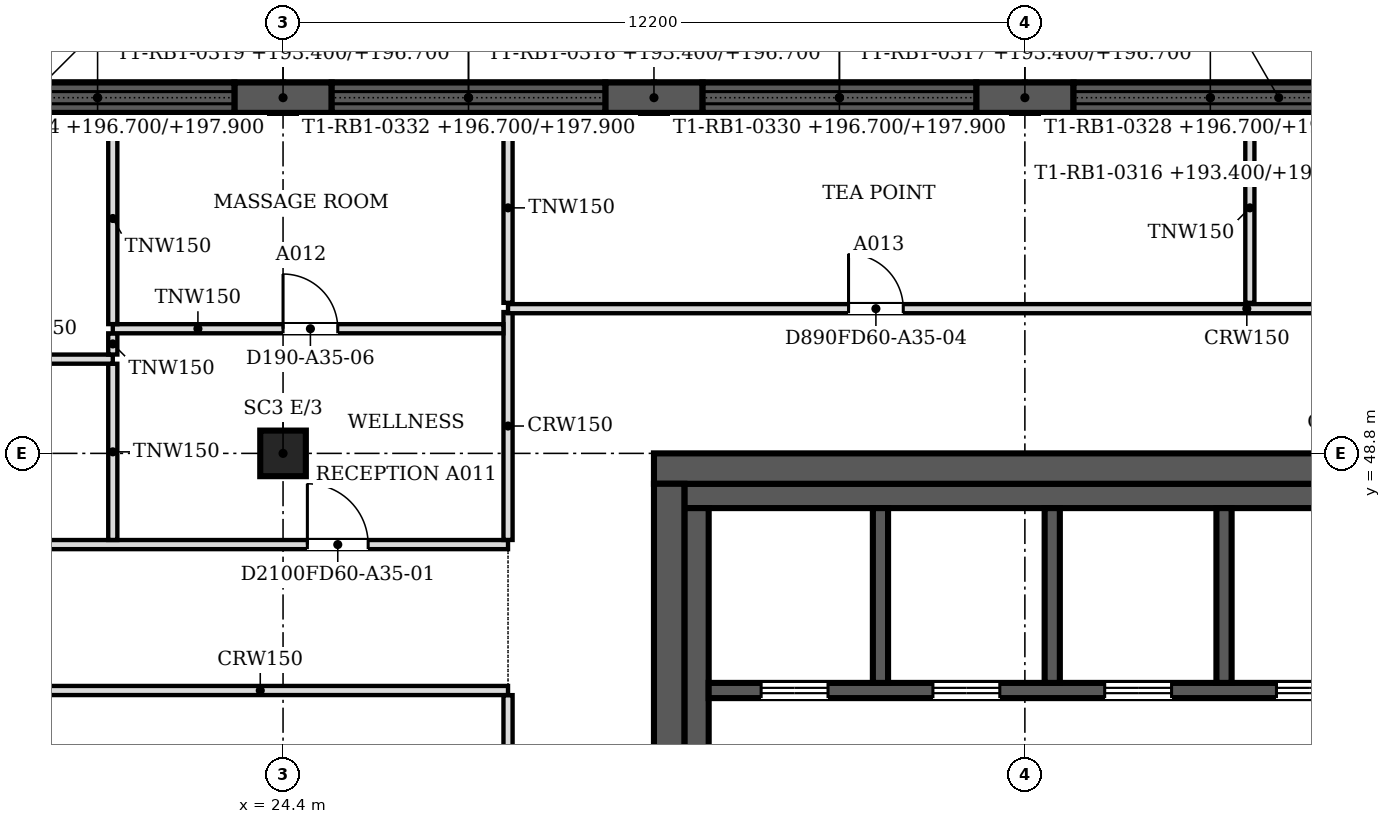
"""IFC4 building model, lengths in metres.
Left out: names, types, materials, properties, quantities, classifications, styles, units other than length and angle.
Written with IfcOpenShell. Run it as: python <this file> out.ifc"""

import sys

from ifc_helpers import new_model, si_unit, direction, frame, frame_2d, origin, origin_2d, place, context, subcontext, project, spatial, polyline, rectangle, outline, extrude, faceted_brep, source, transform, mapped, element, fill, save


model = new_model("IFC4")
c1 = context("Model", 3, precision=1e-05, world=origin(), true_north=direction((0.0, 1.0)))
c2 = subcontext(c1, "Body", "Model", "MODEL_VIEW")
j1 = project(units=[si_unit("LENGTHUNIT", "METRE"), si_unit("PLANEANGLEUNIT", "RADIAN")], contexts=[c1])
p1 = place(None, origin())
s1 = spatial("IfcSite", under=j1, at=p1, CompositionType="ELEMENT")
p2 = place(p1, origin())
s2 = spatial("IfcBuilding", under=s1, at=p2, CompositionType="ELEMENT")
p3 = place(p2, frame((0.0, 0.0, 193.4)))
s3 = spatial("IfcBuildingStorey", under=s2, at=p3, CompositionType="ELEMENT", Elevation=193.4)
p4 = place(p3, frame((24.4, 48.8, 0.0), z_axis=(0.0, 0.0, 1.0), x_axis=(1.0, 0.0, 0.0)))
e1 = element("IfcColumn", 1, at=p4, inside=s3, PredefinedType="COLUMN", context=c2, shape_type="SweptSolid", body=[
    extrude(rectangle(XDim=0.75, YDim=0.75, at=origin_2d()), origin(), (0.0, 0.0, 1.0), 4.3),
])
m1 = source(origin(), c2, "Body", "Brep", [
    faceted_brep([(0.0, -0.25, 0.0), (1.6, -0.25, 0.0), (1.6, -0.25, 3.3), (0.0, -0.25, 3.3), (0.0, 0.25, 3.3), (1.6, 0.25, 3.3), (1.6, 0.25, 0.0), (0.0, 0.25, 0.0)], [[[0, 1, 2, 3]], [[4, 5, 6, 7]], [[7, 6, 1, 0]], [[5, 4, 3, 2]], [[4, 7, 0, 3]], [[1, 6, 5, 2]]]),
])
p5 = place(p3, frame((37.4, 54.65, 0.0), z_axis=(0.0, 0.0, 1.0), x_axis=(-1.0, 0.0, 0.0)))
e2 = element("IfcWall", 2, at=p5, inside=s3, PredefinedType="SOLIDWALL", context=c2, shape_type="MappedRepresentation", body=[
    mapped(m1, transform((0.0, 0.0, 0.0), scale=1.0)),
])
m2 = source(origin(), c2, "Body", "SweptSolid", [
    extrude(outline(polyline([(0.0, 0.0), (1.6, 0.0), (1.6, 3.3), (0.0, 3.3), (0.0, 0.0)])), frame((0.0, 0.25, 0.0), z_axis=(0.0, -1.0, 0.0), x_axis=(1.0, 0.0, 0.0)), (0.0, 0.0, 1.0), 0.5),
])
p6 = place(p3, frame((31.3, 54.65, 0.0), z_axis=(0.0, 0.0, 1.0), x_axis=(-1.0, 0.0, 0.0)))
e3 = element("IfcWall", 3, at=p6, inside=s3, PredefinedType="SOLIDWALL", context=c2, shape_type="MappedRepresentation", body=[
    mapped(m2, transform((0.0, 0.0, 0.0), scale=1.0)),
])
p7 = place(p3, frame((25.2, 54.65, 0.0), z_axis=(0.0, 0.0, 1.0), x_axis=(-1.0, 0.0, 0.0)))
e4 = element("IfcWall", 4, at=p7, inside=s3, PredefinedType="SOLIDWALL", context=c2, shape_type="MappedRepresentation", body=[
    mapped(m1, transform((0.0, 0.0, 0.0), scale=1.0)),
])
m3 = source(origin(), c2, "Body", "SweptSolid", [
    extrude(outline(polyline([(0.0, 0.0), (4.5, 0.0), (4.5, 0.9), (0.0, 0.9), (0.0, 0.0)])), frame((0.0, 0.25, 0.0), z_axis=(0.0, -1.0, 0.0), x_axis=(1.0, 0.0, 0.0)), (0.0, 0.0, 1.0), 0.5),
])
p8 = place(p3, frame((41.9, 54.65, 0.0), z_axis=(0.0, 0.0, 1.0), x_axis=(-1.0, 0.0, 0.0)))
e5 = element("IfcWall", 5, at=p8, inside=s3, PredefinedType="SOLIDWALL", context=c2, shape_type="MappedRepresentation", body=[
    mapped(m3, transform((0.0, 0.0, 0.0), scale=1.0)),
])
m4 = source(origin(), c2, "Body", "Brep", [
    faceted_brep([(0.0, -0.25, 0.0), (6.1, -0.25, 0.0), (6.1, -0.25, 1.2), (0.0, -0.25, 1.2), (0.0, 0.25, 1.2), (6.1, 0.25, 1.2), (6.1, 0.25, 0.0), (0.0, 0.25, 0.0)], [[[0, 1, 2, 3]], [[4, 5, 6, 7]], [[7, 6, 1, 0]], [[5, 4, 3, 2]], [[4, 7, 0, 3]], [[1, 6, 5, 2]]]),
])
p9 = place(p3, frame((42.7, 54.65, 3.3), z_axis=(0.0, 0.0, 1.0), x_axis=(-1.0, 0.0, 0.0)))
e6 = element("IfcWall", 6, at=p9, inside=s3, PredefinedType="SOLIDWALL", context=c2, shape_type="MappedRepresentation", body=[
    mapped(m4, transform((0.0, 0.0, 0.0), scale=1.0)),
])
p10 = place(p3, frame((35.8, 54.65, 0.0), z_axis=(0.0, 0.0, 1.0), x_axis=(-1.0, 0.0, 0.0)))
e7 = element("IfcWall", 7, at=p10, inside=s3, PredefinedType="SOLIDWALL", context=c2, shape_type="MappedRepresentation", body=[
    mapped(m3, transform((0.0, 0.0, 0.0), scale=1.0)),
])
m5 = source(origin(), c2, "Body", "SweptSolid", [
    extrude(outline(polyline([(0.0, 0.0), (6.1, 0.0), (6.1, 1.2), (0.0, 1.2), (0.0, 0.0)])), frame((0.0, 0.25, 0.0), z_axis=(0.0, -1.0, 0.0), x_axis=(1.0, 0.0, 0.0)), (0.0, 0.0, 1.0), 0.5),
])
p11 = place(p3, frame((36.6, 54.65, 3.3), z_axis=(0.0, 0.0, 1.0), x_axis=(-1.0, 0.0, 0.0)))
e8 = element("IfcWall", 8, at=p11, inside=s3, PredefinedType="SOLIDWALL", context=c2, shape_type="MappedRepresentation", body=[
    mapped(m5, transform((0.0, 0.0, 0.0), scale=1.0)),
])
p12 = place(p3, frame((29.7, 54.65, 0.0), z_axis=(0.0, 0.0, 1.0), x_axis=(-1.0, 0.0, 0.0)))
e9 = element("IfcWall", 9, at=p12, inside=s3, PredefinedType="SOLIDWALL", context=c2, shape_type="MappedRepresentation", body=[
    mapped(m3, transform((0.0, 0.0, 0.0), scale=1.0)),
])
p13 = place(p3, frame((30.5, 54.65, 3.3), z_axis=(0.0, 0.0, 1.0), x_axis=(-1.0, 0.0, 0.0)))
e10 = element("IfcWall", 10, at=p13, inside=s3, PredefinedType="SOLIDWALL", context=c2, shape_type="MappedRepresentation", body=[
    mapped(m5, transform((0.0, 0.0, 0.0), scale=1.0)),
])
p14 = place(p3, frame((23.6, 54.65, 0.0), z_axis=(0.0, 0.0, 1.0), x_axis=(-1.0, 0.0, 0.0)))
e11 = element("IfcWall", 11, at=p14, inside=s3, PredefinedType="SOLIDWALL", context=c2, shape_type="MappedRepresentation", body=[
    mapped(m3, transform((0.0, 0.0, 0.0), scale=1.0)),
])
p15 = place(p3, frame((24.4, 54.65, 3.3), z_axis=(0.0, 0.0, 1.0), x_axis=(-1.0, 0.0, 0.0)))
e12 = element("IfcWall", 12, at=p15, inside=s3, PredefinedType="SOLIDWALL", context=c2, shape_type="MappedRepresentation", body=[
    mapped(m4, transform((0.0, 0.0, 0.0), scale=1.0)),
])
p16 = place(p3, frame((30.75, 24.9, 0.0), z_axis=(0.0, 0.0, 1.0), x_axis=(0.0, 1.0, 0.0)))
e13 = element("IfcWall", 13, at=p16, inside=s3, PredefinedType="SHEAR", context=c2, shape_type="SweptSolid", body=[
    extrude(rectangle(XDim=23.4, YDim=0.5, at=frame_2d((11.7, 0.0))), origin(), (0.0, 0.0, 1.0), 4.5),
])
m6 = source(origin(), c2, "Body", "SweptSolid", [
    extrude(rectangle(XDim=2.1, YDim=2.4, at=frame_2d((1.05, 1.2))), frame((0.0, 0.26, 0.0), z_axis=(0.0, -1.0, 0.0), x_axis=(1.0, 0.0, 0.0)), (0.0, 0.0, 1.0), 0.52),
])
p17 = place(p16, frame((4.9, 0.0, 0.0)))
e14 = element("IfcOpeningElement", 14, at=p17, cuts=e13, PredefinedType="OPENING", context=c2, shape_type="MappedRepresentation", body=[
    mapped(m6, transform((0.0, 0.0, 0.0), scale=1.0)),
])
p18 = place(p16, frame((16.4, 0.0, 0.0)))
e15 = element("IfcOpeningElement", 15, at=p18, cuts=e13, PredefinedType="OPENING", context=c2, shape_type="MappedRepresentation", body=[
    mapped(m6, transform((0.0, 0.0, 0.0), scale=1.0)),
])
p19 = place(p3, frame((30.5, 48.55, 0.0), z_axis=(0.0, 0.0, 1.0), x_axis=(1.0, 0.0, 0.0)))
e16 = element("IfcWall", 16, at=p19, inside=s3, PredefinedType="SHEAR", context=c2, shape_type="SweptSolid", body=[
    extrude(rectangle(XDim=24.4, YDim=0.5, at=frame_2d((12.2, 0.0))), origin(), (0.0, 0.0, 1.0), 4.5),
])
p20 = place(p3, frame((31.0, 48.1, 0.0), z_axis=(0.0, 0.0, 1.0), x_axis=(1.0, 0.0, 0.0)))
e17 = element("IfcWall", 17, at=p20, inside=s3, PredefinedType="SOLIDWALL", context=c2, shape_type="SweptSolid", body=[
    extrude(rectangle(XDim=23.4, YDim=0.4, at=frame_2d((11.7, 0.0))), origin(), (0.0, 0.0, 1.0), 4.5),
])
p21 = place(p3, frame((31.2, 43.4, 0.0), z_axis=(0.0, 0.0, 1.0), x_axis=(0.0, 1.0, 0.0)))
e18 = element("IfcWall", 18, at=p21, inside=s3, PredefinedType="SOLIDWALL", context=c2, shape_type="SweptSolid", body=[
    extrude(rectangle(XDim=4.5, YDim=0.4, at=frame_2d((2.25, 0.0))), origin(), (0.0, 0.0, 1.0), 4.5),
])
p22 = place(p3, frame((42.45, 44.9, 0.0), z_axis=(0.0, 0.0, 1.0), x_axis=(-1.0, 0.0, 0.0)))
e19 = element("IfcWall", 19, at=p22, inside=s3, PredefinedType="SOLIDWALL", context=c2, shape_type="SweptSolid", body=[
    extrude(rectangle(XDim=11.05, YDim=0.25, at=frame_2d((5.525, 0.0))), origin(), (0.0, 0.0, 1.0), 4.5),
])
m7 = source(origin(), c2, "Body", "SweptSolid", [
    extrude(rectangle(XDim=1.1, YDim=2.1, at=frame_2d((0.55, 1.05))), frame((0.0, 0.135, 0.0), z_axis=(0.0, -1.0, 0.0), x_axis=(1.0, 0.0, 0.0)), (0.0, 0.0, 1.0), 0.27),
])
p23 = place(p22, frame((9.087, 0.0, 0.0)))
e20 = element("IfcOpeningElement", 20, at=p23, cuts=e19, PredefinedType="OPENING", context=c2, shape_type="MappedRepresentation", body=[
    mapped(m7, transform((0.0, 0.0, 0.0), scale=1.0)),
])
p24 = place(p22, frame((6.262, 0.0, 0.0)))
e21 = element("IfcOpeningElement", 21, at=p24, cuts=e19, PredefinedType="OPENING", context=c2, shape_type="MappedRepresentation", body=[
    mapped(m7, transform((0.0, 0.0, 0.0), scale=1.0)),
])
p25 = place(p22, frame((3.438, 0.0, 0.0)))
e22 = element("IfcOpeningElement", 22, at=p25, cuts=e19, PredefinedType="OPENING", context=c2, shape_type="MappedRepresentation", body=[
    mapped(m7, transform((0.0, 0.0, 0.0), scale=1.0)),
])
p26 = place(p22, frame((0.613, 0.0, 0.0)))
e23 = element("IfcOpeningElement", 23, at=p26, cuts=e19, PredefinedType="OPENING", context=c2, shape_type="MappedRepresentation", body=[
    mapped(m7, transform((0.0, 0.0, 0.0), scale=1.0)),
])
for number, where, z_axis, x_axis in (
    (24, (34.225, 45.025, 0.0), (0.0, 0.0, 1.0), (0.0, 1.0, 0.0)),
    (25, (37.05, 45.025, 0.0), (0.0, 0.0, 1.0), (0.0, 1.0, 0.0)),
    (26, (39.875, 45.025, 0.0), (0.0, 0.0, 1.0), (0.0, 1.0, 0.0)),
):
    element("IfcWall", number, at=place(p3, frame(where, z_axis=z_axis, x_axis=x_axis)), inside=s3, PredefinedType="SOLIDWALL", context=c2, shape_type="SweptSolid", body=[
        extrude(rectangle(XDim=2.875, YDim=0.25, at=frame_2d((1.438, 0.0))), origin(), (0.0, 0.0, 1.0), 4.5),
    ])
p27 = place(p3, frame((28.1, 18.8, 0.0), z_axis=(0.0, 0.0, 1.0), x_axis=(0.0, 1.0, 0.0)))
e27 = element("IfcWall", 27, at=p27, inside=s3, PredefinedType="PARTITIONING", context=c2, shape_type="SweptSolid", body=[
    extrude(rectangle(XDim=26.024, YDim=0.15, at=frame_2d((13.012, 0.0))), origin(), (0.0, 0.0, 1.0), 3.767),
])
m8 = source(origin(), c2, "Body", "SweptSolid", [
    extrude(rectangle(XDim=1.8, YDim=2.1, at=frame_2d((0.9, 1.05))), frame((0.0, 0.085, 0.0), z_axis=(0.0, -1.0, 0.0), x_axis=(1.0, 0.0, 0.0)), (0.0, 0.0, 1.0), 0.17),
])
p28 = place(p27, frame((0.7, 0.0, 0.0)))
e28 = element("IfcOpeningElement", 28, at=p28, cuts=e27, PredefinedType="OPENING", context=c2, shape_type="MappedRepresentation", body=[
    mapped(m8, transform((0.0, 0.0, 0.0), scale=1.0)),
])
p29 = place(p27, frame((22.551, 0.0, 0.0)))
e29 = element("IfcOpeningElement", 29, at=p29, cuts=e27, PredefinedType="OPENING", context=c2, shape_type="MappedRepresentation", body=[
    mapped(m8, transform((0.0, 0.0, 0.0), scale=1.0)),
])
p30 = place(p27, frame((16.851, 0.0, 0.0)))
e30 = element("IfcOpeningElement", 30, at=p30, cuts=e27, PredefinedType="OPENING", context=c2, shape_type="MappedRepresentation", body=[
    mapped(m8, transform((0.0, 0.0, 0.0), scale=1.0)),
])
p31 = place(p27, frame((9.3, 0.0, 0.0)))
e31 = element("IfcOpeningElement", 31, at=p31, cuts=e27, PredefinedType="OPENING", context=c2, shape_type="MappedRepresentation", body=[
    mapped(m8, transform((0.0, 0.0, 0.0), scale=1.0)),
])
p32 = place(p3, frame((28.1, 44.9, 0.0), z_axis=(0.0, 0.0, 1.0), x_axis=(-1.0, 0.0, 0.0)))
e32 = element("IfcWall", 32, at=p32, inside=s3, PredefinedType="PARTITIONING", context=c2, shape_type="SweptSolid", body=[
    extrude(rectangle(XDim=20.6, YDim=0.15, at=frame_2d((10.3, 0.0))), origin(), (0.0, 0.0, 1.0), 3.767),
])
m9 = source(origin(), c2, "Body", "SweptSolid", [
    extrude(rectangle(XDim=0.9, YDim=2.1, at=frame_2d((0.45, 1.05))), frame((0.0, 0.085, 0.0), z_axis=(0.0, -1.0, 0.0), x_axis=(1.0, 0.0, 0.0)), (0.0, 0.0, 1.0), 0.17),
])
p33 = place(p32, frame((16.299, 0.0, 0.0)))
e33 = element("IfcOpeningElement", 33, at=p33, cuts=e32, PredefinedType="OPENING", context=c2, shape_type="MappedRepresentation", body=[
    mapped(m9, transform((0.0, 0.0, 0.0), scale=1.0)),
])
p34 = place(p3, frame((7.5, 47.3, 0.0), z_axis=(0.0, 0.0, 1.0), x_axis=(1.0, 0.0, 0.0)))
e34 = element("IfcWall", 34, at=p34, inside=s3, PredefinedType="PARTITIONING", context=c2, shape_type="SweptSolid", body=[
    extrude(rectangle(XDim=20.6, YDim=0.15, at=frame_2d((10.3, 0.0))), origin(), (0.0, 0.0, 1.0), 3.767),
])
m10 = source(origin(), c2, "Body", "SweptSolid", [
    extrude(rectangle(XDim=1.1, YDim=2.1, at=frame_2d((0.55, 1.05))), frame((0.0, 0.085, 0.0), z_axis=(0.0, -1.0, 0.0), x_axis=(1.0, 0.0, 0.0)), (0.0, 0.0, 1.0), 0.17),
])
p35 = place(p34, frame((0.9, 0.0, 0.0)))
e35 = element("IfcOpeningElement", 35, at=p35, cuts=e34, PredefinedType="OPENING", context=c2, shape_type="MappedRepresentation", body=[
    mapped(m10, transform((0.0, 0.0, 0.0), scale=1.0)),
])
p36 = place(p34, frame((10.1, 0.0, 0.0)))
e36 = element("IfcOpeningElement", 36, at=p36, cuts=e34, PredefinedType="OPENING", context=c2, shape_type="MappedRepresentation", body=[
    mapped(m8, transform((0.0, 0.0, 0.0), scale=1.0)),
])
m11 = source(origin(), c2, "Body", "SweptSolid", [
    extrude(rectangle(XDim=1.0, YDim=2.1, at=frame_2d((0.5, 1.05))), frame((0.0, 0.085, 0.0), z_axis=(0.0, -1.0, 0.0), x_axis=(1.0, 0.0, 0.0)), (0.0, 0.0, 1.0), 0.17),
])
p37 = place(p34, frame((17.3, 0.0, 0.0)))
e37 = element("IfcOpeningElement", 37, at=p37, cuts=e34, PredefinedType="OPENING", context=c2, shape_type="MappedRepresentation", body=[
    mapped(m11, transform((0.0, 0.0, 0.0), scale=1.0)),
])
p38 = place(p3, frame((21.6, 47.376, 0.0), z_axis=(0.0, 0.0, 1.0), x_axis=(0.0, 1.0, 0.0)))
e38 = element("IfcWall", 38, at=p38, inside=s3, PredefinedType="PARTITIONING", context=c2, shape_type="SweptSolid", body=[
    extrude(rectangle(XDim=2.898, YDim=0.15, at=frame_2d((1.449, 0.0))), origin(), (0.0, 0.0, 1.0), 3.767),
])
p39 = place(p3, frame((28.1, 47.376, 0.0), z_axis=(0.0, 0.0, 1.0), x_axis=(0.0, 1.0, 0.0)))
e39 = element("IfcWall", 39, at=p39, inside=s3, PredefinedType="PARTITIONING", context=c2, shape_type="SweptSolid", body=[
    extrude(rectangle(XDim=3.748, YDim=0.15, at=frame_2d((1.874, 0.0))), origin(), (0.0, 0.0, 1.0), 3.767),
])
p40 = place(p3, frame((15.5, 50.35, 0.0), z_axis=(0.0, 0.0, 1.0), x_axis=(1.0, 0.0, 0.0)))
e40 = element("IfcWall", 40, at=p40, inside=s3, PredefinedType="PARTITIONING", context=c2, shape_type="SweptSolid", body=[
    extrude(rectangle(XDim=6.1, YDim=0.15, at=frame_2d((3.05, 0.0))), origin(), (0.0, 0.0, 1.0), 3.767),
])
p41 = place(p40, frame((2.6, 0.0, 0.0)))
e41 = element("IfcOpeningElement", 41, at=p41, cuts=e40, PredefinedType="OPENING", context=c2, shape_type="MappedRepresentation", body=[
    mapped(m9, transform((0.0, 0.0, 0.0), scale=1.0)),
])
p42 = place(p3, frame((21.6, 50.426, 0.0), z_axis=(0.0, 0.0, 1.0), x_axis=(0.0, 1.0, 0.0)))
e42 = element("IfcWall", 42, at=p42, inside=s3, PredefinedType="PARTITIONING", context=c2, shape_type="SweptSolid", body=[
    extrude(rectangle(XDim=0.348, YDim=0.15, at=frame_2d((0.174, 0.0))), origin(), (0.0, 0.0, 1.0), 3.767),
])
p43 = place(p3, frame((21.6, 50.85, 0.0), z_axis=(0.0, 0.0, 1.0), x_axis=(1.0, 0.0, 0.0)))
e43 = element("IfcWall", 43, at=p43, inside=s3, PredefinedType="PARTITIONING", context=c2, shape_type="SweptSolid", body=[
    extrude(rectangle(XDim=6.424, YDim=0.15, at=frame_2d((3.212, 0.0))), origin(), (0.0, 0.0, 1.0), 3.767),
])
p44 = place(p43, frame((2.8, 0.0, 0.0)))
e44 = element("IfcOpeningElement", 44, at=p44, cuts=e43, PredefinedType="OPENING", context=c2, shape_type="MappedRepresentation", body=[
    mapped(m9, transform((0.0, 0.0, 0.0), scale=1.0)),
])
p45 = place(p3, frame((21.6, 50.926, 0.0), z_axis=(0.0, 0.0, 1.0), x_axis=(0.0, 1.0, 0.0)))
e45 = element("IfcWall", 45, at=p45, inside=s3, PredefinedType="PARTITIONING", context=c2, shape_type="SweptSolid", body=[
    extrude(rectangle(XDim=3.474, YDim=0.15, at=frame_2d((1.737, 0.0))), origin(), (0.0, 0.0, 1.0), 3.767),
])
p46 = place(p3, frame((28.1, 51.18, 0.0), z_axis=(0.0, 0.0, 1.0), x_axis=(1.0, 0.0, 0.0)))
e46 = element("IfcWall", 46, at=p46, inside=s3, PredefinedType="PARTITIONING", context=c2, shape_type="SweptSolid", body=[
    extrude(rectangle(XDim=31.438, YDim=0.15, at=frame_2d((15.719, 0.0))), origin(), (0.0, 0.0, 1.0), 3.767),
])
p47 = place(p46, frame((27.501, 0.0, 0.0)))
e47 = element("IfcOpeningElement", 47, at=p47, cuts=e46, PredefinedType="OPENING", context=c2, shape_type="MappedRepresentation", body=[
    mapped(m9, transform((0.0, 0.0, 0.0), scale=1.0)),
])
p48 = place(p46, frame((5.6, 0.0, 0.0)))
e48 = element("IfcOpeningElement", 48, at=p48, cuts=e46, PredefinedType="OPENING", context=c2, shape_type="MappedRepresentation", body=[
    mapped(m9, transform((0.0, 0.0, 0.0), scale=1.0)),
])
p49 = place(p46, frame((17.8, 0.0, 0.0)))
e49 = element("IfcOpeningElement", 49, at=p49, cuts=e46, PredefinedType="OPENING", context=c2, shape_type="MappedRepresentation", body=[
    mapped(m9, transform((0.0, 0.0, 0.0), scale=1.0)),
])
for number, where, z_axis, x_axis in (
    (50, (28.1, 51.276, 0.0), (0.0, 0.0, 1.0), (0.0, 1.0, 0.0)),
    (51, (40.3, 51.276, 0.0), (0.0, 0.0, 1.0), (0.0, 1.0, 0.0)),
):
    element("IfcWall", number, at=place(p3, frame(where, z_axis=z_axis, x_axis=x_axis)), inside=s3, PredefinedType="PARTITIONING", context=c2, shape_type="SweptSolid", body=[
        extrude(rectangle(XDim=3.124, YDim=0.15, at=frame_2d((1.562, 0.0))), origin(), (0.0, 0.0, 1.0), 3.767),
    ])
m12 = source(origin(), c2, "Body", "SweptSolid", [
    extrude(rectangle(XDim=1.1, YDim=2.1, at=frame_2d((0.55, 1.05))), frame((0.0, 0.025, 0.0), z_axis=(0.0, -1.0, 0.0), x_axis=(1.0, 0.0, 0.0)), (0.0, 0.0, 1.0), 0.05),
])
p50 = place(p23, origin())
e52 = element("IfcDoor", 52, at=p50, inside=s3, OperationType="DOUBLE_DOOR_SLIDING", PredefinedType="DOOR", context=c2, shape_type="MappedRepresentation", body=[
    mapped(m12, transform((0.0, 0.0, 0.0), scale=1.0)),
])
fill(e20, e52)
p51 = place(p24, origin())
e53 = element("IfcDoor", 53, at=p51, inside=s3, OperationType="DOUBLE_DOOR_SLIDING", PredefinedType="DOOR", context=c2, shape_type="MappedRepresentation", body=[
    mapped(m12, transform((0.0, 0.0, 0.0), scale=1.0)),
])
fill(e21, e53)
p52 = place(p25, origin())
e54 = element("IfcDoor", 54, at=p52, inside=s3, OperationType="DOUBLE_DOOR_SLIDING", PredefinedType="DOOR", context=c2, shape_type="MappedRepresentation", body=[
    mapped(m12, transform((0.0, 0.0, 0.0), scale=1.0)),
])
fill(e22, e54)
p53 = place(p26, origin())
e55 = element("IfcDoor", 55, at=p53, inside=s3, OperationType="DOUBLE_DOOR_SLIDING", PredefinedType="DOOR", context=c2, shape_type="MappedRepresentation", body=[
    mapped(m12, transform((0.0, 0.0, 0.0), scale=1.0)),
])
fill(e23, e55)
m13 = source(origin(), c2, "Body", "SweptSolid", [
    extrude(rectangle(XDim=0.9, YDim=2.1, at=frame_2d((0.45, 1.05))), frame((0.0, 0.025, 0.0), z_axis=(0.0, -1.0, 0.0), x_axis=(1.0, 0.0, 0.0)), (0.0, 0.0, 1.0), 0.05),
])
p54 = place(p44, origin())
e56 = element("IfcDoor", 56, at=p54, inside=s3, OperationType="SINGLE_SWING_LEFT", PredefinedType="DOOR", context=c2, shape_type="MappedRepresentation", body=[
    mapped(m13, transform((0.0, 0.0, 0.0), scale=1.0)),
])
fill(e44, e56)
m14 = source(origin(), c2, "Body", "SweptSolid", [
    extrude(rectangle(XDim=1.0, YDim=2.1, at=frame_2d((0.5, 1.05))), frame((0.0, 0.025, 0.0), z_axis=(0.0, -1.0, 0.0), x_axis=(1.0, 0.0, 0.0)), (0.0, 0.0, 1.0), 0.05),
])
p55 = place(p37, origin())
e57 = element("IfcDoor", 57, at=p55, inside=s3, OperationType="SINGLE_SWING_LEFT", PredefinedType="DOOR", context=c2, shape_type="MappedRepresentation", body=[
    mapped(m14, transform((0.0, 0.0, 0.0), scale=1.0)),
])
fill(e37, e57)
p56 = place(p48, origin())
e58 = element("IfcDoor", 58, at=p56, inside=s3, OperationType="SINGLE_SWING_LEFT", PredefinedType="DOOR", context=c2, shape_type="MappedRepresentation", body=[
    mapped(m13, transform((0.0, 0.0, 0.0), scale=1.0)),
])
fill(e48, e58)
save(model, sys.argv[1])
